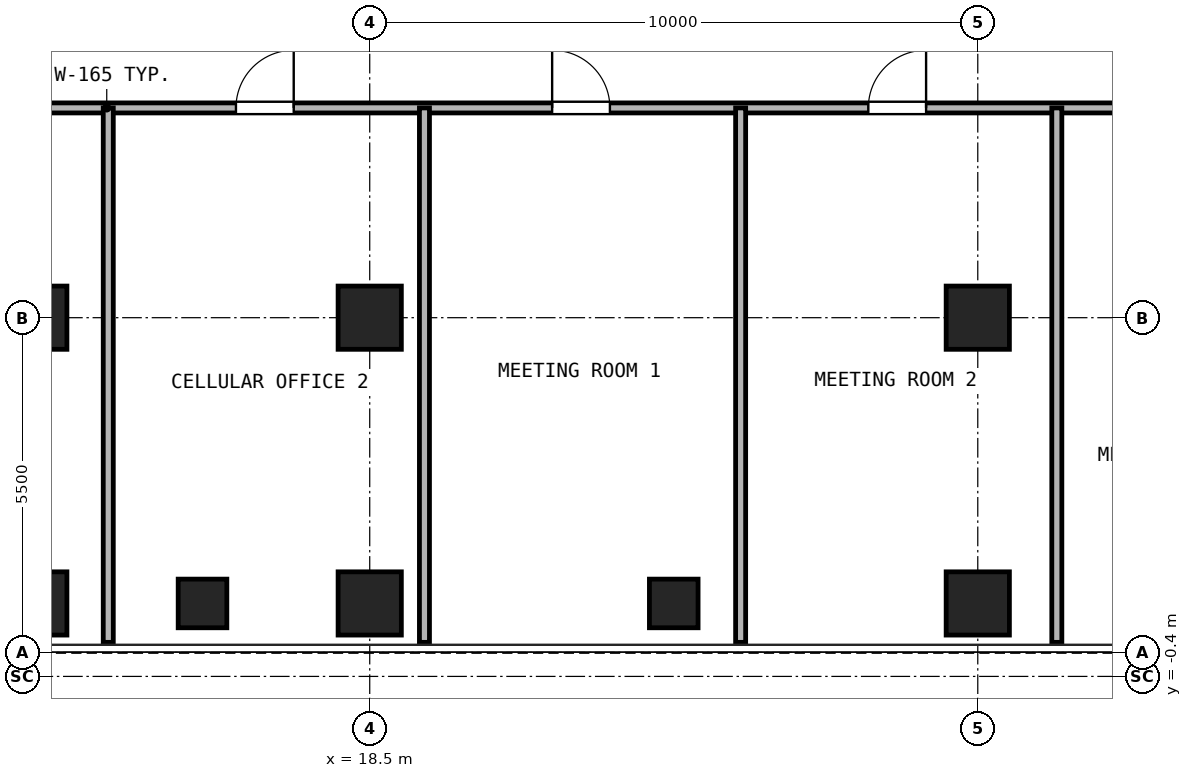
"""IFC4 building model, lengths in metres.
Left out: names, types, materials, properties, quantities, classifications, styles, units other than length and angle.
Written with IfcOpenShell. Run it as: python <this file> out.ifc"""

import sys

from ifc_helpers import new_model, si_unit, direction, frame, frame_2d, origin, origin_2d, place, context, subcontext, project, spatial, rectangle, hollow_rectangle, extrude, source, transform, mapped, element, fill, save


model = new_model("IFC4")
c1 = context("Model", 3, precision=1e-05, world=origin(), true_north=direction((0.0, 1.0)))
c2 = subcontext(c1, "Body", "Model", "MODEL_VIEW")
j1 = project(units=[si_unit("LENGTHUNIT", "METRE"), si_unit("PLANEANGLEUNIT", "RADIAN")], contexts=[c1])
p1 = place(None, origin())
s1 = spatial("IfcSite", under=j1, at=p1, CompositionType="ELEMENT")
p2 = place(p1, origin())
s2 = spatial("IfcBuilding", under=s1, at=p2, CompositionType="ELEMENT")
p3 = place(p2, frame((0.0, 0.0, 51.3)))
s3 = spatial("IfcBuildingStorey", under=s2, at=p3, CompositionType="ELEMENT", Elevation=51.3)
m1 = source(origin(), c2, "Body", "SweptSolid", [
    extrude(hollow_rectangle(XDim=1.04, YDim=1.04, WallThickness=0.065, at=origin_2d()), origin(), (0.0, 0.0, 1.0), 3.32),
])
for number, where, z_axis, x_axis in (
    (1, (13.0, 0.8, 0.0), (0.0, 0.0, 1.0), (1.0, 0.0, 0.0)),
    (2, (18.5, 0.8, 0.0), (0.0, 0.0, 1.0), (1.0, 0.0, 0.0)),
    (3, (28.5, 0.8, 0.0), (0.0, 0.0, 1.0), (1.0, 0.0, 0.0)),
    (4, (13.0, 5.5, 0.0), (0.0, 0.0, 1.0), (1.0, 0.0, 0.0)),
    (5, (18.5, 5.5, 0.0), (0.0, 0.0, 1.0), (1.0, 0.0, 0.0)),
    (6, (28.5, 5.5, 0.0), (0.0, 0.0, 1.0), (1.0, 0.0, 0.0)),
):
    element("IfcColumn", number, at=place(p3, frame(where, z_axis=z_axis, x_axis=x_axis)), inside=s3, PredefinedType="COLUMN", context=c2, shape_type="MappedRepresentation", body=[
        mapped(m1, transform((0.0, 0.0, 0.0), x_axis=(1.0, 0.0, 0.0), y_axis=(0.0, 1.0, 0.0), z_axis=(0.0, 0.0, 1.0), scale=1.0)),
    ])
m2 = source(origin(), c2, "Body", "SweptSolid", [
    extrude(hollow_rectangle(XDim=0.8, YDim=0.8, WallThickness=0.045, at=origin_2d()), origin(), (0.0, 0.0, 1.0), 3.32),
])
for number, where, z_axis, x_axis in (
    (7, (15.75, 0.8, 0.0), (0.0, 0.0, 1.0), (1.0, 0.0, 0.0)),
    (8, (23.5, 0.8, 0.0), (0.0, 0.0, 1.0), (1.0, 0.0, 0.0)),
):
    element("IfcColumn", number, at=place(p3, frame(where, z_axis=z_axis, x_axis=x_axis)), inside=s3, PredefinedType="COLUMN", context=c2, shape_type="MappedRepresentation", body=[
        mapped(m2, transform((0.0, 0.0, 0.0), x_axis=(1.0, 0.0, 0.0), y_axis=(0.0, 1.0, 0.0), z_axis=(0.0, 0.0, 1.0), scale=1.0)),
    ])
p4 = place(p3, frame((9.0, 8.95, 0.0), z_axis=(0.0, 0.0, 1.0), x_axis=(1.0, 0.0, 0.0)))
e9 = element("IfcWall", 9, at=p4, inside=s3, PredefinedType="PARTITIONING", context=c2, shape_type="SweptSolid", body=[
    extrude(rectangle(XDim=29.0, YDim=0.165, at=frame_2d((14.5, 0.0))), origin(), (0.0, 0.0, 1.0), 3.32),
])
p5 = place(p4, frame((2.1, 0.0, 0.0)))
e10 = element("IfcOpeningElement", 10, at=p5, cuts=e9, PredefinedType="OPENING", context=c2, shape_type="SweptSolid", body=[
    extrude(rectangle(XDim=0.95, YDim=2.15, at=frame_2d((0.475, 1.075))), frame((0.0, 0.093, 0.0), z_axis=(0.0, -1.0, 0.0), x_axis=(1.0, 0.0, 0.0)), (0.0, 0.0, 1.0), 0.185),
])
p6 = place(p4, frame((7.3, 0.0, 0.0)))
e11 = element("IfcOpeningElement", 11, at=p6, cuts=e9, PredefinedType="OPENING", context=c2, shape_type="SweptSolid", body=[
    extrude(rectangle(XDim=0.95, YDim=2.15, at=frame_2d((0.475, 1.075))), frame((0.0, 0.093, 0.0), z_axis=(0.0, -1.0, 0.0), x_axis=(1.0, 0.0, 0.0)), (0.0, 0.0, 1.0), 0.185),
])
p7 = place(p4, frame((12.5, 0.0, 0.0)))
e12 = element("IfcOpeningElement", 12, at=p7, cuts=e9, PredefinedType="OPENING", context=c2, shape_type="SweptSolid", body=[
    extrude(rectangle(XDim=0.95, YDim=2.15, at=frame_2d((0.475, 1.075))), frame((0.0, 0.093, 0.0), z_axis=(0.0, -1.0, 0.0), x_axis=(1.0, 0.0, 0.0)), (0.0, 0.0, 1.0), 0.185),
])
p8 = place(p4, frame((17.7, 0.0, 0.0)))
e13 = element("IfcOpeningElement", 13, at=p8, cuts=e9, PredefinedType="OPENING", context=c2, shape_type="SweptSolid", body=[
    extrude(rectangle(XDim=0.95, YDim=2.15, at=frame_2d((0.475, 1.075))), frame((0.0, 0.093, 0.0), z_axis=(0.0, -1.0, 0.0), x_axis=(1.0, 0.0, 0.0)), (0.0, 0.0, 1.0), 0.185),
])
p9 = place(p4, frame((22.3, 0.0, 0.0)))
e14 = element("IfcOpeningElement", 14, at=p9, cuts=e9, PredefinedType="OPENING", context=c2, shape_type="SweptSolid", body=[
    extrude(rectangle(XDim=0.95, YDim=2.15, at=frame_2d((0.475, 1.075))), frame((0.0, 0.093, 0.0), z_axis=(0.0, -1.0, 0.0), x_axis=(1.0, 0.0, 0.0)), (0.0, 0.0, 1.0), 0.185),
])
p10 = place(p4, frame((25.4, 0.0, 0.0)))
e15 = element("IfcOpeningElement", 15, at=p10, cuts=e9, PredefinedType="OPENING", context=c2, shape_type="SweptSolid", body=[
    extrude(rectangle(XDim=0.92, YDim=2.1, at=frame_2d((0.46, 1.05))), frame((0.0, 0.093, 0.0), z_axis=(0.0, -1.0, 0.0), x_axis=(1.0, 0.0, 0.0)), (0.0, 0.0, 1.0), 0.185),
])
p11 = place(p4, frame((27.5, 0.0, 0.0)))
e16 = element("IfcOpeningElement", 16, at=p11, cuts=e9, PredefinedType="OPENING", context=c2, shape_type="SweptSolid", body=[
    extrude(rectangle(XDim=0.92, YDim=2.1, at=frame_2d((0.46, 1.05))), frame((0.0, 0.093, 0.0), z_axis=(0.0, -1.0, 0.0), x_axis=(1.0, 0.0, 0.0)), (0.0, 0.0, 1.0), 0.185),
])
for number, where, z_axis, x_axis in (
    (17, (14.2, 0.16, 0.0), (0.0, 0.0, 1.0), (0.0, 1.0, 0.0)),
    (18, (19.4, 0.16, 0.0), (0.0, 0.0, 1.0), (0.0, 1.0, 0.0)),
    (19, (24.6, 0.16, 0.0), (0.0, 0.0, 1.0), (0.0, 1.0, 0.0)),
    (20, (29.8, 0.16, 0.0), (0.0, 0.0, 1.0), (0.0, 1.0, 0.0)),
):
    element("IfcWall", number, at=place(p3, frame(where, z_axis=z_axis, x_axis=x_axis)), inside=s3, PredefinedType="PARTITIONING", context=c2, shape_type="SweptSolid", body=[
        extrude(rectangle(XDim=8.79, YDim=0.165, at=frame_2d((4.395, 0.0))), origin(), (0.0, 0.0, 1.0), 3.32),
    ])
p12 = place(p6, frame((0.95, 0.0, 0.0), z_axis=(0.0, 0.0, 1.0), x_axis=(-1.0, 0.0, 0.0)))
e21 = element("IfcDoor", 21, at=p12, inside=s3, OperationType="SINGLE_SWING_RIGHT", PredefinedType="DOOR", context=c2, shape_type="SweptSolid", body=[
    extrude(rectangle(XDim=0.95, YDim=2.15, at=frame_2d((0.475, 1.075))), frame((0.0, 0.025, 0.0), z_axis=(0.0, -1.0, 0.0), x_axis=(1.0, 0.0, 0.0)), (0.0, 0.0, 1.0), 0.05),
])
fill(e11, e21)
p13 = place(p7, frame((0.95, 0.0, 0.0), z_axis=(0.0, 0.0, 1.0), x_axis=(-1.0, 0.0, 0.0)))
e22 = element("IfcDoor", 22, at=p13, inside=s3, OperationType="SINGLE_SWING_LEFT", PredefinedType="DOOR", context=c2, shape_type="SweptSolid", body=[
    extrude(rectangle(XDim=0.95, YDim=2.15, at=frame_2d((0.475, 1.075))), frame((0.0, 0.025, 0.0), z_axis=(0.0, -1.0, 0.0), x_axis=(1.0, 0.0, 0.0)), (0.0, 0.0, 1.0), 0.05),
])
fill(e12, e22)
p14 = place(p8, frame((0.95, 0.0, 0.0), z_axis=(0.0, 0.0, 1.0), x_axis=(-1.0, 0.0, 0.0)))
e23 = element("IfcDoor", 23, at=p14, inside=s3, OperationType="SINGLE_SWING_RIGHT", PredefinedType="DOOR", context=c2, shape_type="SweptSolid", body=[
    extrude(rectangle(XDim=0.95, YDim=2.15, at=frame_2d((0.475, 1.075))), frame((0.0, 0.025, 0.0), z_axis=(0.0, -1.0, 0.0), x_axis=(1.0, 0.0, 0.0)), (0.0, 0.0, 1.0), 0.05),
])
fill(e13, e23)
save(model, sys.argv[1])
